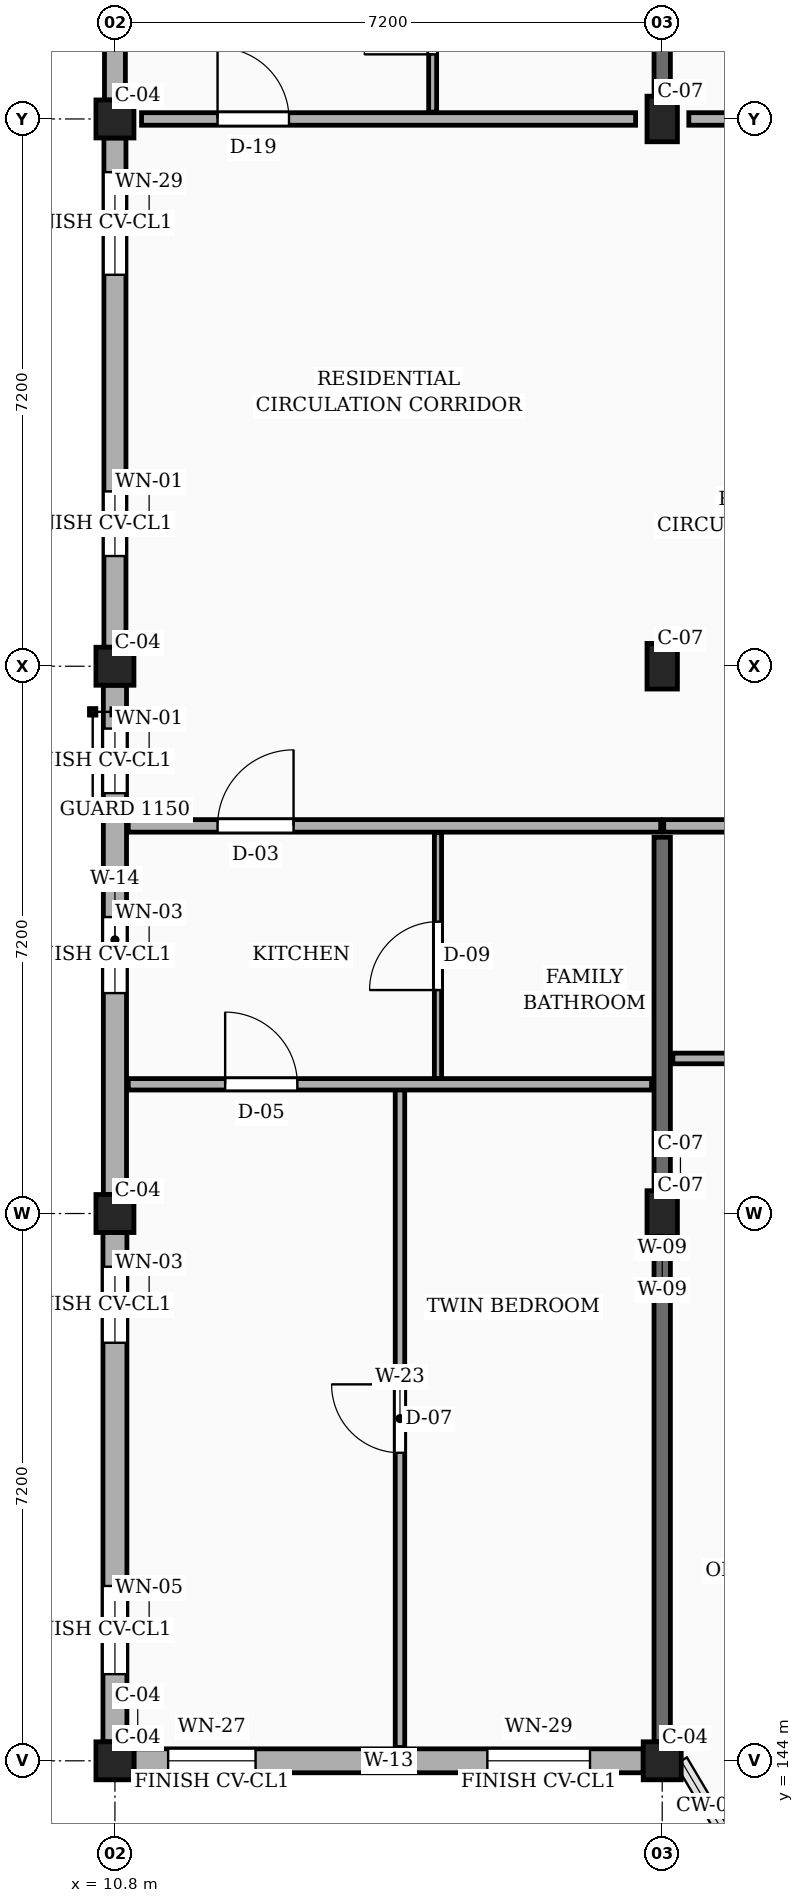
"""IFC4 building model, lengths in metres.
Left out: names, types, materials, properties, quantities, classifications, styles, units other than length and angle.
Written with IfcOpenShell. Run it as: python <this file> out.ifc"""

import sys

from ifc_helpers import new_model, si_unit, direction, frame, frame_2d, origin, origin_2d, place, context, subcontext, project, spatial, rectangle, extrude, element, fill, save


model = new_model("IFC4")
c1 = context("Model", 3, precision=1e-05, world=origin(), true_north=direction((0.0, 1.0)))
c2 = subcontext(c1, "Body", "Model", "MODEL_VIEW")
j1 = project(units=[si_unit("LENGTHUNIT", "METRE"), si_unit("PLANEANGLEUNIT", "RADIAN")], contexts=[c1])
p1 = place(None, origin())
s1 = spatial("IfcSite", under=j1, at=p1, CompositionType="ELEMENT")
p2 = place(p1, origin())
s2 = spatial("IfcBuilding", under=s1, at=p2, CompositionType="ELEMENT")
p3 = place(p2, frame((0.0, 0.0, 26.55)))
s3 = spatial("IfcBuildingStorey", under=s2, at=p3, CompositionType="ELEMENT", Elevation=26.55)
for number, where, z_axis, x_axis in (
    (1, (10.8, 144.0, 0.0), (0.0, 0.0, 1.0), (1.0, 0.0, 0.0)),
    (2, (10.8, 151.2, 0.0), (0.0, 0.0, 1.0), (1.0, 0.0, 0.0)),
    (3, (10.8, 158.4, 0.0), (0.0, 0.0, 1.0), (1.0, 0.0, 0.0)),
    (4, (10.8, 165.6, 0.0), (0.0, 0.0, 1.0), (1.0, 0.0, 0.0)),
    (5, (18.0, 144.0, 0.0), (0.0, 0.0, 1.0), (1.0, 0.0, 0.0)),
):
    element("IfcColumn", number, at=place(p3, frame(where, z_axis=z_axis, x_axis=x_axis)), inside=s3, PredefinedType="COLUMN", context=c2, shape_type="SweptSolid", body=[
        extrude(rectangle(XDim=0.5, YDim=0.5, at=origin_2d()), origin(), (0.0, 0.0, 1.0), 3.15),
    ])
for number, where, z_axis, x_axis in (
    (6, (18.0, 151.2, 0.0), (0.0, 0.0, 1.0), (1.0, 0.0, 0.0)),
    (7, (18.0, 158.4, 0.0), (0.0, 0.0, 1.0), (1.0, 0.0, 0.0)),
    (8, (18.0, 165.6, 0.0), (0.0, 0.0, 1.0), (1.0, 0.0, 0.0)),
):
    element("IfcColumn", number, at=place(p3, frame(where, z_axis=z_axis, x_axis=x_axis)), inside=s3, PredefinedType="COLUMN", context=c2, shape_type="SweptSolid", body=[
        extrude(rectangle(XDim=0.4, YDim=0.6, at=origin_2d()), origin(), (0.0, 0.0, 1.0), 3.15),
    ])
p4 = place(p3, frame((18.0, 144.25, 0.0), z_axis=(0.0, 0.0, 1.0), x_axis=(0.0, 1.0, 0.0)))
e9 = element("IfcWall", 9, at=p4, inside=s3, PredefinedType="SOLIDWALL", context=c2, shape_type="SweptSolid", body=[
    extrude(rectangle(XDim=11.9, YDim=0.215, at=frame_2d((5.95, 0.0))), origin(), (0.0, 0.0, 1.0), 2.185),
])
p5 = place(p3, frame((18.0, 165.9, 0.0), z_axis=(0.0, 0.0, 1.0), x_axis=(0.0, 1.0, 0.0)))
e10 = element("IfcWall", 10, at=p5, inside=s3, PredefinedType="SOLIDWALL", context=c2, shape_type="SweptSolid", body=[
    extrude(rectangle(XDim=6.65, YDim=0.215, at=frame_2d((3.325, 0.0))), origin(), (0.0, 0.0, 1.0), 2.185),
])
p6 = place(p3, frame((11.05, 144.0, 0.0), z_axis=(0.0, 0.0, 1.0), x_axis=(1.0, 0.0, 0.0)))
e11 = element("IfcWall", 11, at=p6, inside=s3, PredefinedType="SOLIDWALL", context=c2, shape_type="SweptSolid", body=[
    extrude(rectangle(XDim=6.7, YDim=0.315, at=frame_2d((3.35, 0.0))), origin(), (0.0, 0.0, 1.0), 2.455),
])
p7 = place(p6, frame((0.45, 0.0, 0.78)))
e12 = element("IfcOpeningElement", 12, at=p7, cuts=e11, PredefinedType="OPENING", context=c2, shape_type="SweptSolid", body=[
    extrude(rectangle(XDim=1.15, YDim=1.44, at=frame_2d((0.575, 0.72))), frame((0.0, 0.167, 0.0), z_axis=(0.0, -1.0, 0.0), x_axis=(1.0, 0.0, 0.0)), (0.0, 0.0, 1.0), 0.335),
])
p8 = place(p6, frame((4.65, 0.0, 0.78)))
e13 = element("IfcOpeningElement", 13, at=p8, cuts=e11, PredefinedType="OPENING", context=c2, shape_type="SweptSolid", body=[
    extrude(rectangle(XDim=1.35, YDim=1.44, at=frame_2d((0.675, 0.72))), frame((0.0, 0.167, 0.0), z_axis=(0.0, -1.0, 0.0), x_axis=(1.0, 0.0, 0.0)), (0.0, 0.0, 1.0), 0.335),
])
p9 = place(p3, frame((10.8, 172.55, 0.0), z_axis=(0.0, 0.0, 1.0), x_axis=(0.0, -1.0, 0.0)))
e14 = element("IfcWall", 14, at=p9, inside=s3, PredefinedType="SOLIDWALL", context=c2, shape_type="SweptSolid", body=[
    extrude(rectangle(XDim=6.7, YDim=0.275, at=frame_2d((3.35, 0.0))), origin(), (0.0, 0.0, 1.0), 2.455),
])
p10 = place(p9, frame((0.45, 0.0, 0.78)))
e15 = element("IfcOpeningElement", 15, at=p10, cuts=e14, PredefinedType="OPENING", context=c2, shape_type="SweptSolid", body=[
    extrude(rectangle(XDim=1.15, YDim=1.44, at=frame_2d((0.575, 0.72))), frame((0.0, 0.147, 0.0), z_axis=(0.0, -1.0, 0.0), x_axis=(1.0, 0.0, 0.0)), (0.0, 0.0, 1.0), 0.295),
])
p11 = place(p9, frame((4.65, 0.0, 0.78)))
e16 = element("IfcOpeningElement", 16, at=p11, cuts=e14, PredefinedType="OPENING", context=c2, shape_type="SweptSolid", body=[
    extrude(rectangle(XDim=1.35, YDim=1.44, at=frame_2d((0.675, 0.72))), frame((0.0, 0.147, 0.0), z_axis=(0.0, -1.0, 0.0), x_axis=(1.0, 0.0, 0.0)), (0.0, 0.0, 1.0), 0.295),
])
p12 = place(p3, frame((10.8, 165.35, 0.0), z_axis=(0.0, 0.0, 1.0), x_axis=(0.0, -1.0, 0.0)))
e17 = element("IfcWall", 17, at=p12, inside=s3, PredefinedType="SOLIDWALL", context=c2, shape_type="SweptSolid", body=[
    extrude(rectangle(XDim=6.7, YDim=0.29, at=frame_2d((3.35, 0.0))), origin(), (0.0, 0.0, 1.0), 2.455),
])
p13 = place(p12, frame((0.45, 0.0, 0.78)))
e18 = element("IfcOpeningElement", 18, at=p13, cuts=e17, PredefinedType="OPENING", context=c2, shape_type="SweptSolid", body=[
    extrude(rectangle(XDim=1.35, YDim=1.44, at=frame_2d((0.675, 0.72))), frame((0.0, 0.155, 0.0), z_axis=(0.0, -1.0, 0.0), x_axis=(1.0, 0.0, 0.0)), (0.0, 0.0, 1.0), 0.31),
])
p14 = place(p12, frame((4.65, 0.0, 0.78)))
e19 = element("IfcOpeningElement", 19, at=p14, cuts=e17, PredefinedType="OPENING", context=c2, shape_type="SweptSolid", body=[
    extrude(rectangle(XDim=0.85, YDim=1.15, at=frame_2d((0.425, 0.575))), frame((0.0, 0.155, 0.0), z_axis=(0.0, -1.0, 0.0), x_axis=(1.0, 0.0, 0.0)), (0.0, 0.0, 1.0), 0.31),
])
p15 = place(p3, frame((10.8, 158.15, 0.0), z_axis=(0.0, 0.0, 1.0), x_axis=(0.0, -1.0, 0.0)))
e20 = element("IfcWall", 20, at=p15, inside=s3, PredefinedType="SOLIDWALL", context=c2, shape_type="SweptSolid", body=[
    extrude(rectangle(XDim=6.7, YDim=0.305, at=frame_2d((3.35, 0.0))), origin(), (0.0, 0.0, 1.0), 2.455),
])
p16 = place(p15, frame((0.57, 0.0, 0.78)))
e21 = element("IfcOpeningElement", 21, at=p16, cuts=e20, PredefinedType="OPENING", context=c2, shape_type="SweptSolid", body=[
    extrude(rectangle(XDim=0.85, YDim=1.15, at=frame_2d((0.425, 0.575))), frame((0.0, 0.163, 0.0), z_axis=(0.0, -1.0, 0.0), x_axis=(1.0, 0.0, 0.0)), (0.0, 0.0, 1.0), 0.325),
])
p17 = place(p15, frame((3.05, 0.0, 0.78)))
e22 = element("IfcOpeningElement", 22, at=p17, cuts=e20, PredefinedType="OPENING", context=c2, shape_type="SweptSolid", body=[
    extrude(rectangle(XDim=1.0, YDim=1.15, at=frame_2d((0.5, 0.575))), frame((0.0, 0.163, 0.0), z_axis=(0.0, -1.0, 0.0), x_axis=(1.0, 0.0, 0.0)), (0.0, 0.0, 1.0), 0.325),
])
p18 = place(p3, frame((10.8, 150.95, 0.0), z_axis=(0.0, 0.0, 1.0), x_axis=(0.0, -1.0, 0.0)))
e23 = element("IfcWall", 23, at=p18, inside=s3, PredefinedType="SOLIDWALL", context=c2, shape_type="SweptSolid", body=[
    extrude(rectangle(XDim=6.7, YDim=0.315, at=frame_2d((3.35, 0.0))), origin(), (0.0, 0.0, 1.0), 2.455),
])
p19 = place(p18, frame((0.45, 0.0, 0.78)))
e24 = element("IfcOpeningElement", 24, at=p19, cuts=e23, PredefinedType="OPENING", context=c2, shape_type="SweptSolid", body=[
    extrude(rectangle(XDim=1.0, YDim=1.15, at=frame_2d((0.5, 0.575))), frame((0.0, 0.167, 0.0), z_axis=(0.0, -1.0, 0.0), x_axis=(1.0, 0.0, 0.0)), (0.0, 0.0, 1.0), 0.335),
])
p20 = place(p18, frame((4.65, 0.0, 0.78)))
e25 = element("IfcOpeningElement", 25, at=p20, cuts=e23, PredefinedType="OPENING", context=c2, shape_type="SweptSolid", body=[
    extrude(rectangle(XDim=1.16, YDim=1.15, at=frame_2d((0.58, 0.575))), frame((0.0, 0.167, 0.0), z_axis=(0.0, -1.0, 0.0), x_axis=(1.0, 0.0, 0.0)), (0.0, 0.0, 1.0), 0.335),
])
p21 = place(p3, frame((10.975, 156.3, 0.0), z_axis=(0.0, 0.0, 1.0), x_axis=(1.0, 0.0, 0.0)))
e26 = element("IfcWall", 26, at=p21, inside=s3, PredefinedType="PARTITIONING", context=c2, shape_type="SweptSolid", body=[
    extrude(rectangle(XDim=7.005, YDim=0.165, at=frame_2d((3.502, 0.0))), origin(), (0.0, 0.0, 1.0), 2.32),
])
p22 = place(p21, frame((1.175, 0.0, 0.0)))
e27 = element("IfcOpeningElement", 27, at=p22, cuts=e26, PredefinedType="OPENING", context=c2, shape_type="SweptSolid", body=[
    extrude(rectangle(XDim=1.0, YDim=2.15, at=frame_2d((0.5, 1.075))), frame((0.0, 0.093, 0.0), z_axis=(0.0, -1.0, 0.0), x_axis=(1.0, 0.0, 0.0)), (0.0, 0.0, 1.0), 0.185),
])
p23 = place(p3, frame((18.02, 156.3, 0.0), z_axis=(0.0, 0.0, 1.0), x_axis=(1.0, 0.0, 0.0)))
e28 = element("IfcWall", 28, at=p23, inside=s3, PredefinedType="PARTITIONING", context=c2, shape_type="SweptSolid", body=[
    extrude(rectangle(XDim=7.16, YDim=0.165, at=frame_2d((3.58, 0.0))), origin(), (0.0, 0.0, 1.0), 2.32),
])
p24 = place(p23, frame((1.33, 0.0, 0.0)))
e29 = element("IfcOpeningElement", 29, at=p24, cuts=e28, PredefinedType="OPENING", context=c2, shape_type="SweptSolid", body=[
    extrude(rectangle(XDim=0.94, YDim=2.12, at=frame_2d((0.47, 1.06))), frame((0.0, 0.093, 0.0), z_axis=(0.0, -1.0, 0.0), x_axis=(1.0, 0.0, 0.0)), (0.0, 0.0, 1.0), 0.185),
])
p25 = place(p3, frame((11.15, 165.6, 0.0), z_axis=(0.0, 0.0, 1.0), x_axis=(1.0, 0.0, 0.0)))
e30 = element("IfcWall", 30, at=p25, inside=s3, PredefinedType="PARTITIONING", context=c2, shape_type="SweptSolid", body=[
    extrude(rectangle(XDim=6.5, YDim=0.165, at=frame_2d((3.25, 0.0))), origin(), (0.0, 0.0, 1.0), 2.32),
])
p26 = place(p25, frame((1.0, 0.0, 0.0)))
e31 = element("IfcOpeningElement", 31, at=p26, cuts=e30, PredefinedType="OPENING", context=c2, shape_type="SweptSolid", body=[
    extrude(rectangle(XDim=0.94, YDim=2.12, at=frame_2d((0.47, 1.06))), frame((0.0, 0.093, 0.0), z_axis=(0.0, -1.0, 0.0), x_axis=(1.0, 0.0, 0.0)), (0.0, 0.0, 1.0), 0.185),
])
p27 = place(p3, frame((18.35, 165.6, 0.0), z_axis=(0.0, 0.0, 1.0), x_axis=(1.0, 0.0, 0.0)))
e32 = element("IfcWall", 32, at=p27, inside=s3, PredefinedType="PARTITIONING", context=c2, shape_type="SweptSolid", body=[
    extrude(rectangle(XDim=6.5, YDim=0.165, at=frame_2d((3.25, 0.0))), origin(), (0.0, 0.0, 1.0), 2.32),
])
p28 = place(p27, frame((1.0, 0.0, 0.0)))
e33 = element("IfcOpeningElement", 33, at=p28, cuts=e32, PredefinedType="OPENING", context=c2, shape_type="SweptSolid", body=[
    extrude(rectangle(XDim=1.14, YDim=2.18, at=frame_2d((0.57, 1.09))), frame((0.0, 0.093, 0.0), z_axis=(0.0, -1.0, 0.0), x_axis=(1.0, 0.0, 0.0)), (0.0, 0.0, 1.0), 0.185),
])
p29 = place(p3, frame((14.55, 144.175, 0.0), z_axis=(0.0, 0.0, 1.0), x_axis=(0.0, 1.0, 0.0)))
e34 = element("IfcWall", 34, at=p29, inside=s3, PredefinedType="PARTITIONING", context=c2, shape_type="SweptSolid", body=[
    extrude(rectangle(XDim=8.655, YDim=0.125, at=frame_2d((4.328, 0.0))), origin(), (0.0, 0.0, 1.0), 2.32),
])
p30 = place(p29, frame((3.877, 0.0, 0.0)))
e35 = element("IfcOpeningElement", 35, at=p30, cuts=e34, PredefinedType="OPENING", context=c2, shape_type="SweptSolid", body=[
    extrude(rectangle(XDim=0.9, YDim=2.1, at=frame_2d((0.45, 1.05))), frame((0.0, 0.073, 0.0), z_axis=(0.0, -1.0, 0.0), x_axis=(1.0, 0.0, 0.0)), (0.0, 0.0, 1.0), 0.145),
])
p31 = place(p3, frame((15.05, 152.97, 0.0), z_axis=(0.0, 0.0, 1.0), x_axis=(0.0, 1.0, 0.0)))
e36 = element("IfcWall", 36, at=p31, inside=s3, PredefinedType="PARTITIONING", context=c2, shape_type="SweptSolid", body=[
    extrude(rectangle(XDim=3.24, YDim=0.095, at=frame_2d((1.62, 0.0))), origin(), (0.0, 0.0, 1.0), 2.32),
])
p32 = place(p31, frame((1.17, 0.0, 0.0)))
e37 = element("IfcOpeningElement", 37, at=p32, cuts=e36, PredefinedType="OPENING", context=c2, shape_type="SweptSolid", body=[
    extrude(rectangle(XDim=0.9, YDim=2.05, at=frame_2d((0.45, 1.025))), frame((0.0, 0.058, 0.0), z_axis=(0.0, -1.0, 0.0), x_axis=(1.0, 0.0, 0.0)), (0.0, 0.0, 1.0), 0.115),
])
p33 = place(p3, frame((10.975, 152.9, 0.0), z_axis=(0.0, 0.0, 1.0), x_axis=(1.0, 0.0, 0.0)))
e38 = element("IfcWall", 38, at=p33, inside=s3, PredefinedType="PARTITIONING", context=c2, shape_type="SweptSolid", body=[
    extrude(rectangle(XDim=6.885, YDim=0.15, at=frame_2d((3.442, 0.0))), origin(), (0.0, 0.0, 1.0), 2.32),
])
p34 = place(p33, frame((1.275, 0.0, 0.0)))
e39 = element("IfcOpeningElement", 39, at=p34, cuts=e38, PredefinedType="OPENING", context=c2, shape_type="SweptSolid", body=[
    extrude(rectangle(XDim=0.95, YDim=2.1, at=frame_2d((0.475, 1.05))), frame((0.0, 0.085, 0.0), z_axis=(0.0, -1.0, 0.0), x_axis=(1.0, 0.0, 0.0)), (0.0, 0.0, 1.0), 0.17),
])
p35 = place(p3, frame((14.98, 165.69, 0.0), z_axis=(0.0, 0.0, 1.0), x_axis=(0.0, 1.0, 0.0)))
e40 = element("IfcWall", 40, at=p35, inside=s3, PredefinedType="PARTITIONING", context=c2, shape_type="SweptSolid", body=[
    extrude(rectangle(XDim=2.42, YDim=0.105, at=frame_2d((1.21, 0.0))), origin(), (0.0, 0.0, 1.0), 2.32),
])
p36 = place(p35, frame((0.76, 0.0, 0.0)))
e41 = element("IfcOpeningElement", 41, at=p36, cuts=e40, PredefinedType="OPENING", context=c2, shape_type="SweptSolid", body=[
    extrude(rectangle(XDim=0.9, YDim=2.05, at=frame_2d((0.45, 1.025))), frame((0.0, 0.062, 0.0), z_axis=(0.0, -1.0, 0.0), x_axis=(1.0, 0.0, 0.0)), (0.0, 0.0, 1.0), 0.125),
])
p37 = place(p3, frame((18.14, 153.24, 0.0), z_axis=(0.0, 0.0, 1.0), x_axis=(1.0, 0.0, 0.0)))
e42 = element("IfcWall", 42, at=p37, inside=s3, PredefinedType="PARTITIONING", context=c2, shape_type="SweptSolid", body=[
    extrude(rectangle(XDim=6.92, YDim=0.14, at=frame_2d((3.46, 0.0))), origin(), (0.0, 0.0, 1.0), 2.32),
])
p38 = place(p37, frame((1.31, 0.0, 0.0)))
e43 = element("IfcOpeningElement", 43, at=p38, cuts=e42, PredefinedType="OPENING", context=c2, shape_type="SweptSolid", body=[
    extrude(rectangle(XDim=0.92, YDim=2.1, at=frame_2d((0.46, 1.05))), frame((0.0, 0.08, 0.0), z_axis=(0.0, -1.0, 0.0), x_axis=(1.0, 0.0, 0.0)), (0.0, 0.0, 1.0), 0.16),
])
p39 = place(p7, origin())
e44 = element("IfcWindow", 44, at=p39, inside=s3, PartitioningType="SINGLE_PANEL", PredefinedType="WINDOW", context=c2, shape_type="SweptSolid", body=[
    extrude(rectangle(XDim=1.15, YDim=1.44, at=frame_2d((0.575, 0.72))), frame((0.0, 0.03, 0.0), z_axis=(0.0, -1.0, 0.0), x_axis=(1.0, 0.0, 0.0)), (0.0, 0.0, 1.0), 0.06),
])
fill(e12, e44)
p40 = place(p8, origin())
e45 = element("IfcWindow", 45, at=p40, inside=s3, PartitioningType="SINGLE_PANEL", PredefinedType="WINDOW", context=c2, shape_type="SweptSolid", body=[
    extrude(rectangle(XDim=1.35, YDim=1.44, at=frame_2d((0.675, 0.72))), frame((0.0, 0.03, 0.0), z_axis=(0.0, -1.0, 0.0), x_axis=(1.0, 0.0, 0.0)), (0.0, 0.0, 1.0), 0.06),
])
fill(e13, e45)
p41 = place(p13, origin())
e46 = element("IfcWindow", 46, at=p41, inside=s3, PartitioningType="SINGLE_PANEL", PredefinedType="WINDOW", context=c2, shape_type="SweptSolid", body=[
    extrude(rectangle(XDim=1.35, YDim=1.44, at=frame_2d((0.675, 0.72))), frame((0.0, 0.03, 0.0), z_axis=(0.0, -1.0, 0.0), x_axis=(1.0, 0.0, 0.0)), (0.0, 0.0, 1.0), 0.06),
])
fill(e18, e46)
p42 = place(p14, origin())
e47 = element("IfcWindow", 47, at=p42, inside=s3, PartitioningType="SINGLE_PANEL", PredefinedType="WINDOW", context=c2, shape_type="SweptSolid", body=[
    extrude(rectangle(XDim=0.85, YDim=1.15, at=frame_2d((0.425, 0.575))), frame((0.0, 0.03, 0.0), z_axis=(0.0, -1.0, 0.0), x_axis=(1.0, 0.0, 0.0)), (0.0, 0.0, 1.0), 0.06),
])
fill(e19, e47)
p43 = place(p16, origin())
e48 = element("IfcWindow", 48, at=p43, inside=s3, PartitioningType="SINGLE_PANEL", PredefinedType="WINDOW", context=c2, shape_type="SweptSolid", body=[
    extrude(rectangle(XDim=0.85, YDim=1.15, at=frame_2d((0.425, 0.575))), frame((0.0, 0.03, 0.0), z_axis=(0.0, -1.0, 0.0), x_axis=(1.0, 0.0, 0.0)), (0.0, 0.0, 1.0), 0.06),
])
fill(e21, e48)
p44 = place(p17, origin())
e49 = element("IfcWindow", 49, at=p44, inside=s3, PartitioningType="SINGLE_PANEL", PredefinedType="WINDOW", context=c2, shape_type="SweptSolid", body=[
    extrude(rectangle(XDim=1.0, YDim=1.15, at=frame_2d((0.5, 0.575))), frame((0.0, 0.03, 0.0), z_axis=(0.0, -1.0, 0.0), x_axis=(1.0, 0.0, 0.0)), (0.0, 0.0, 1.0), 0.06),
])
fill(e22, e49)
p45 = place(p19, origin())
e50 = element("IfcWindow", 50, at=p45, inside=s3, PartitioningType="SINGLE_PANEL", PredefinedType="WINDOW", context=c2, shape_type="SweptSolid", body=[
    extrude(rectangle(XDim=1.0, YDim=1.15, at=frame_2d((0.5, 0.575))), frame((0.0, 0.03, 0.0), z_axis=(0.0, -1.0, 0.0), x_axis=(1.0, 0.0, 0.0)), (0.0, 0.0, 1.0), 0.06),
])
fill(e24, e50)
p46 = place(p20, origin())
e51 = element("IfcWindow", 51, at=p46, inside=s3, PartitioningType="SINGLE_PANEL", PredefinedType="WINDOW", context=c2, shape_type="SweptSolid", body=[
    extrude(rectangle(XDim=1.16, YDim=1.15, at=frame_2d((0.58, 0.575))), frame((0.0, 0.03, 0.0), z_axis=(0.0, -1.0, 0.0), x_axis=(1.0, 0.0, 0.0)), (0.0, 0.0, 1.0), 0.06),
])
fill(e25, e51)
p47 = place(p22, origin())
e52 = element("IfcDoor", 52, at=p47, inside=s3, OperationType="SINGLE_SWING_RIGHT", PredefinedType="DOOR", context=c2, shape_type="SweptSolid", body=[
    extrude(rectangle(XDim=1.0, YDim=2.15, at=frame_2d((0.5, 1.075))), frame((0.0, 0.025, 0.0), z_axis=(0.0, -1.0, 0.0), x_axis=(1.0, 0.0, 0.0)), (0.0, 0.0, 1.0), 0.05),
])
fill(e27, e52)
p48 = place(p26, origin())
e53 = element("IfcDoor", 53, at=p48, inside=s3, OperationType="SINGLE_SWING_LEFT", PredefinedType="DOOR", context=c2, shape_type="SweptSolid", body=[
    extrude(rectangle(XDim=0.94, YDim=2.12, at=frame_2d((0.47, 1.06))), frame((0.0, 0.025, 0.0), z_axis=(0.0, -1.0, 0.0), x_axis=(1.0, 0.0, 0.0)), (0.0, 0.0, 1.0), 0.05),
])
fill(e31, e53)
p49 = place(p30, origin())
e54 = element("IfcDoor", 54, at=p49, inside=s3, OperationType="SINGLE_SWING_RIGHT", PredefinedType="DOOR", context=c2, shape_type="SweptSolid", body=[
    extrude(rectangle(XDim=0.9, YDim=2.1, at=frame_2d((0.45, 1.05))), frame((0.0, 0.025, 0.0), z_axis=(0.0, -1.0, 0.0), x_axis=(1.0, 0.0, 0.0)), (0.0, 0.0, 1.0), 0.05),
])
fill(e35, e54)
p50 = place(p32, origin())
e55 = element("IfcDoor", 55, at=p50, inside=s3, OperationType="SINGLE_SWING_LEFT", PredefinedType="DOOR", context=c2, shape_type="SweptSolid", body=[
    extrude(rectangle(XDim=0.9, YDim=2.05, at=frame_2d((0.45, 1.025))), frame((0.0, 0.025, 0.0), z_axis=(0.0, -1.0, 0.0), x_axis=(1.0, 0.0, 0.0)), (0.0, 0.0, 1.0), 0.05),
])
fill(e37, e55)
p51 = place(p34, origin())
e56 = element("IfcDoor", 56, at=p51, inside=s3, OperationType="SINGLE_SWING_LEFT", PredefinedType="DOOR", context=c2, shape_type="SweptSolid", body=[
    extrude(rectangle(XDim=0.95, YDim=2.1, at=frame_2d((0.475, 1.05))), frame((0.0, 0.025, 0.0), z_axis=(0.0, -1.0, 0.0), x_axis=(1.0, 0.0, 0.0)), (0.0, 0.0, 1.0), 0.05),
])
fill(e39, e56)
p52 = place(p36, origin())
e57 = element("IfcDoor", 57, at=p52, inside=s3, OperationType="SINGLE_SWING_LEFT", PredefinedType="DOOR", context=c2, shape_type="SweptSolid", body=[
    extrude(rectangle(XDim=0.9, YDim=2.05, at=frame_2d((0.45, 1.025))), frame((0.0, 0.025, 0.0), z_axis=(0.0, -1.0, 0.0), x_axis=(1.0, 0.0, 0.0)), (0.0, 0.0, 1.0), 0.05),
])
fill(e41, e57)
save(model, sys.argv[1])
